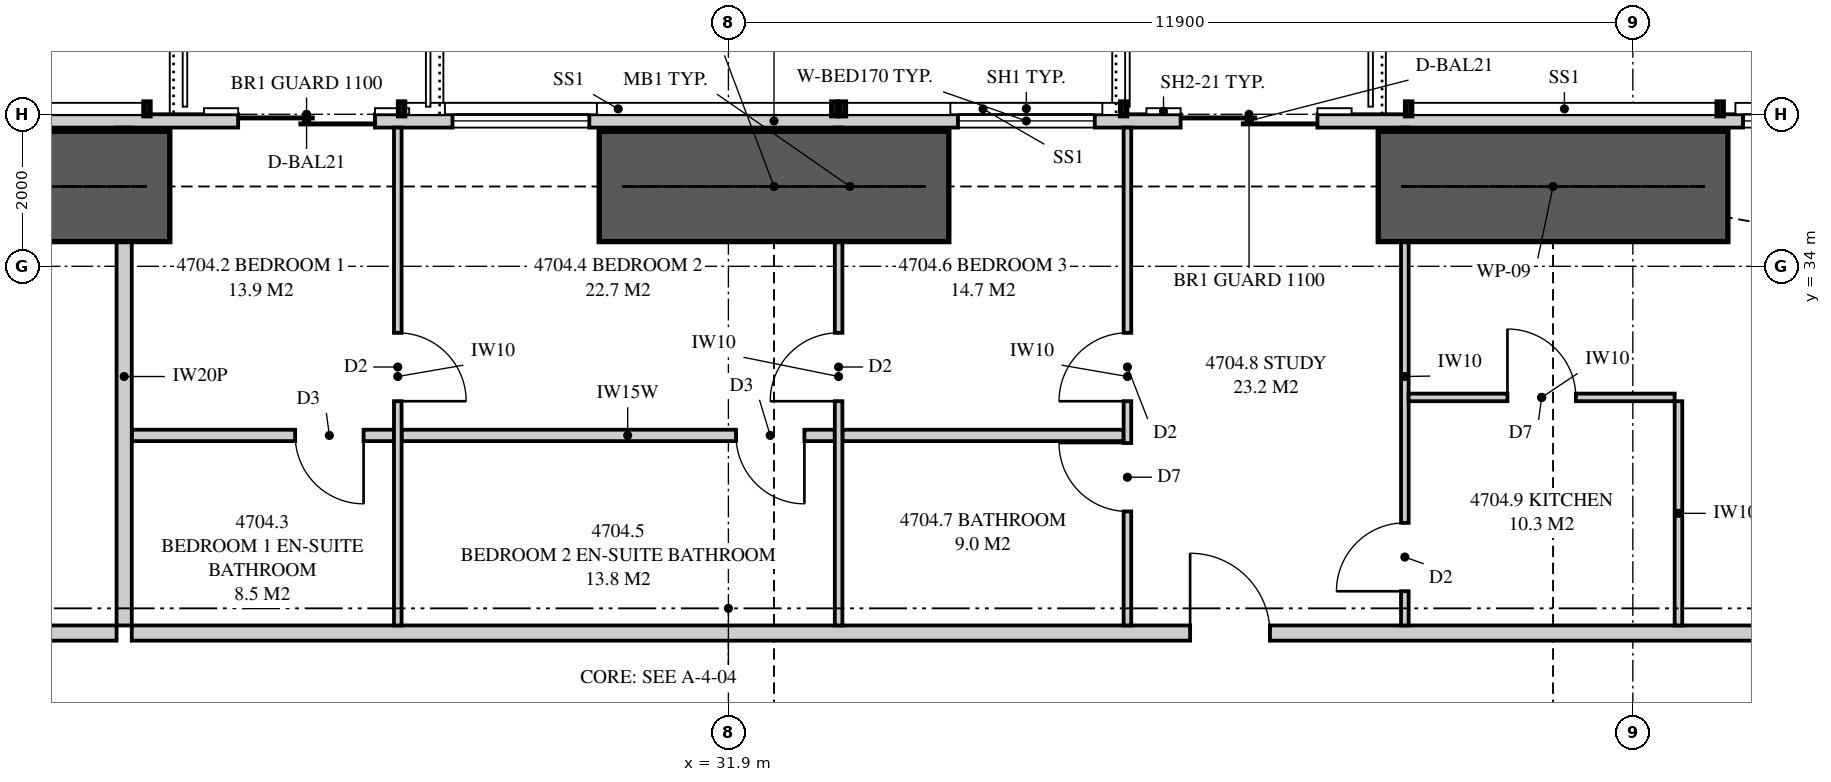
"""IFC4 building model, lengths in metres.
Left out: names, types, materials, properties, quantities, classifications, styles, units other than length and angle.
Written with IfcOpenShell. Run it as: python <this file> out.ifc"""

import sys

from ifc_helpers import new_model, si_unit, direction, frame, frame_2d, origin, place, context, subcontext, project, spatial, polyline, rectangle, outline, extrude, element, fill, save


model = new_model("IFC4")
c1 = context("Model", 3, precision=1e-05, world=origin(), true_north=direction((0.0, 1.0)))
c2 = subcontext(c1, "Body", "Model", "MODEL_VIEW")
j1 = project(units=[si_unit("LENGTHUNIT", "METRE"), si_unit("PLANEANGLEUNIT", "RADIAN")], contexts=[c1])
p1 = place(None, origin())
s1 = spatial("IfcSite", under=j1, at=p1, CompositionType="ELEMENT")
p2 = place(p1, origin())
s2 = spatial("IfcBuilding", under=s1, at=p2, CompositionType="ELEMENT")
p3 = place(p2, frame((0.0, 0.0, 174.45)))
s3 = spatial("IfcBuildingStorey", under=s2, at=p3, CompositionType="ELEMENT", Elevation=174.45)
p4 = place(p3, frame((49.949, 35.913, 0.0), z_axis=(0.0, 0.0, 1.0), x_axis=(-1.0, 0.0, 0.0)))
e1 = element("IfcWall", 1, at=p4, inside=s3, PredefinedType="SOLIDWALL", context=c2, shape_type="SweptSolid", body=[
    extrude(outline(polyline([(0.0, 0.0), (34.897, 0.0), (34.897, 3.11), (27.91, 3.11), (27.91, 2.15), (27.836, 2.15), (27.836, 3.11), (27.699, 3.11), (27.699, 2.15), (7.199, 2.15), (7.199, 3.11), (7.062, 3.11), (7.062, 2.15), (6.987, 2.15), (6.987, 3.11), (0.0, 3.11), (0.0, 0.0)])), frame((0.0, 0.087, 0.0), z_axis=(0.0, -1.0, 0.0), x_axis=(1.0, 0.0, 0.0)), (0.0, 0.0, 1.0), 0.175),
])
p5 = place(p4, frame((2.3, 0.0, 0.4)))
e2 = element("IfcOpeningElement", 2, at=p5, cuts=e1, PredefinedType="OPENING", context=c2, shape_type="SweptSolid", body=[
    extrude(rectangle(XDim=2.4, YDim=1.7, at=frame_2d((1.2, 0.85))), frame((0.0, 0.097, 0.0), z_axis=(0.0, -1.0, 0.0), x_axis=(1.0, 0.0, 0.0)), (0.0, 0.0, 1.0), 0.195),
])
p6 = place(p4, frame((10.299, 0.0, 0.0)))
e3 = element("IfcOpeningElement", 3, at=p6, cuts=e1, PredefinedType="OPENING", context=c2, shape_type="SweptSolid", body=[
    extrude(rectangle(XDim=1.8, YDim=2.1, at=frame_2d((0.9, 1.05))), frame((0.0, 0.097, 0.0), z_axis=(0.0, -1.0, 0.0), x_axis=(1.0, 0.0, 0.0)), (0.0, 0.0, 1.0), 0.195),
])
p7 = place(p4, frame((13.229, 0.0, 0.4)))
e4 = element("IfcOpeningElement", 4, at=p7, cuts=e1, PredefinedType="OPENING", context=c2, shape_type="SweptSolid", body=[
    extrude(rectangle(XDim=1.8, YDim=1.7, at=frame_2d((0.9, 0.85))), frame((0.0, 0.097, 0.0), z_axis=(0.0, -1.0, 0.0), x_axis=(1.0, 0.0, 0.0)), (0.0, 0.0, 1.0), 0.195),
])
p8 = place(p4, frame((19.879, 0.0, 0.4)))
e5 = element("IfcOpeningElement", 5, at=p8, cuts=e1, PredefinedType="OPENING", context=c2, shape_type="SweptSolid", body=[
    extrude(rectangle(XDim=1.8, YDim=1.7, at=frame_2d((0.9, 0.85))), frame((0.0, 0.097, 0.0), z_axis=(0.0, -1.0, 0.0), x_axis=(1.0, 0.0, 0.0)), (0.0, 0.0, 1.0), 0.195),
])
p9 = place(p4, frame((22.699, 0.0, 0.0)))
e6 = element("IfcOpeningElement", 6, at=p9, cuts=e1, PredefinedType="OPENING", context=c2, shape_type="SweptSolid", body=[
    extrude(rectangle(XDim=1.8, YDim=2.1, at=frame_2d((0.9, 1.05))), frame((0.0, 0.097, 0.0), z_axis=(0.0, -1.0, 0.0), x_axis=(1.0, 0.0, 0.0)), (0.0, 0.0, 1.0), 0.195),
])
p10 = place(p4, frame((30.243, 0.0, 0.4)))
e7 = element("IfcOpeningElement", 7, at=p10, cuts=e1, PredefinedType="OPENING", context=c2, shape_type="SweptSolid", body=[
    extrude(rectangle(XDim=1.2, YDim=1.7, at=frame_2d((0.6, 0.85))), frame((0.0, 0.097, 0.0), z_axis=(0.0, -1.0, 0.0), x_axis=(1.0, 0.0, 0.0)), (0.0, 0.0, 1.0), 0.195),
])
p11 = place(p3, frame((23.95, 35.825, 0.0), z_axis=(0.0, 0.0, 1.0), x_axis=(0.0, -1.0, 0.0)))
e8 = element("IfcWall", 8, at=p11, inside=s3, PredefinedType="PARTITIONING", context=c2, shape_type="SweptSolid", body=[
    extrude(outline(polyline([(0.529, 2.15), (0.0, 2.15), (0.0, 0.0), (0.529, 0.0), (0.529, 0.123), (1.021, 0.123), (1.021, 0.0), (6.55, 0.0), (6.55, 3.11), (1.685, 3.11), (1.685, 2.15), (1.021, 2.15), (1.021, 2.027), (0.529, 2.027), (0.529, 2.15)])), frame((0.0, 0.1, 0.0), z_axis=(0.0, -1.0, 0.0), x_axis=(1.0, 0.0, 0.0)), (0.0, 0.0, 1.0), 0.2),
])
p12 = place(p3, frame((17.85, 29.175, 0.0), z_axis=(0.0, 0.0, 1.0), x_axis=(1.0, 0.0, 0.0)))
e9 = element("IfcWall", 9, at=p12, inside=s3, PredefinedType="PARTITIONING", context=c2, shape_type="SweptSolid", body=[
    extrude(outline(polyline([(0.0, 0.0), (6.0, 0.0), (6.0, 3.11), (4.737, 3.11), (4.737, 2.541), (4.062, 2.541), (4.062, 3.11), (0.0, 3.11), (0.0, 0.0)])), frame((0.0, 0.1, 0.0), z_axis=(0.0, -1.0, 0.0), x_axis=(1.0, 0.0, 0.0)), (0.0, 0.0, 1.0), 0.2),
])
p13 = place(p12, frame((2.1, 0.0, 0.0)))
e10 = element("IfcOpeningElement", 10, at=p13, cuts=e9, PredefinedType="OPENING", context=c2, shape_type="SweptSolid", body=[
    extrude(rectangle(XDim=1.8, YDim=2.1, at=frame_2d((0.9, 1.05))), frame((0.0, 0.11, 0.0), z_axis=(0.0, -1.0, 0.0), x_axis=(1.0, 0.0, 0.0)), (0.0, 0.0, 1.0), 0.22),
])
p14 = place(p3, frame((24.05, 29.175, 0.0), z_axis=(0.0, 0.0, 1.0), x_axis=(1.0, 0.0, 0.0)))
e11 = element("IfcWall", 11, at=p14, inside=s3, PredefinedType="PARTITIONING", context=c2, shape_type="SweptSolid", body=[
    extrude(outline(polyline([(0.0, 0.0), (21.9, 0.0), (21.9, 3.11), (19.037, 3.11), (19.037, 2.541), (18.363, 2.541), (18.363, 3.11), (8.787, 3.11), (8.787, 2.541), (8.113, 2.541), (8.113, 3.11), (0.0, 3.11), (0.0, 0.0)])), frame((0.0, 0.1, 0.0), z_axis=(0.0, -1.0, 0.0), x_axis=(1.0, 0.0, 0.0)), (0.0, 0.0, 1.0), 0.2),
])
p15 = place(p14, frame((13.925, 0.0, 0.0)))
e12 = element("IfcOpeningElement", 12, at=p15, cuts=e11, PredefinedType="OPENING", context=c2, shape_type="SweptSolid", body=[
    extrude(rectangle(XDim=1.05, YDim=2.2, at=frame_2d((0.525, 1.1))), frame((0.0, 0.11, 0.0), z_axis=(0.0, -1.0, 0.0), x_axis=(1.0, 0.0, 0.0)), (0.0, 0.0, 1.0), 0.22),
])
p16 = place(p3, frame((27.55, 35.825, 0.0), z_axis=(0.0, 0.0, 1.0), x_axis=(0.0, -1.0, 0.0)))
e13 = element("IfcWall", 13, at=p16, inside=s3, PredefinedType="PARTITIONING", context=c2, shape_type="SweptSolid", body=[
    extrude(outline(polyline([(0.0, 0.0), (6.55, 0.0), (6.55, 3.11), (1.635, 3.11), (1.635, 2.15), (0.0, 2.15), (0.0, 3.11), (0.0, 0.0)])), frame((0.0, 0.05, 0.0), z_axis=(0.0, -1.0, 0.0), x_axis=(1.0, 0.0, 0.0)), (0.0, 0.0, 1.0), 0.1),
])
p17 = place(p16, frame((2.7, 0.0, 0.0)))
e14 = element("IfcOpeningElement", 14, at=p17, cuts=e13, PredefinedType="OPENING", context=c2, shape_type="SweptSolid", body=[
    extrude(rectangle(XDim=0.9, YDim=2.1, at=frame_2d((0.45, 1.05))), frame((0.0, 0.06, 0.0), z_axis=(0.0, -1.0, 0.0), x_axis=(1.0, 0.0, 0.0)), (0.0, 0.0, 1.0), 0.12),
])
p18 = place(p3, frame((33.35, 35.825, 0.0), z_axis=(0.0, 0.0, 1.0), x_axis=(0.0, -1.0, 0.0)))
e15 = element("IfcWall", 15, at=p18, inside=s3, PredefinedType="PARTITIONING", context=c2, shape_type="SweptSolid", body=[
    extrude(outline(polyline([(0.529, 2.15), (0.0, 2.15), (0.0, 0.0), (0.529, 0.0), (0.529, 0.793), (1.021, 0.793), (1.021, 0.0), (6.55, 0.0), (6.55, 3.11), (1.635, 3.11), (1.635, 2.15), (1.021, 2.15), (1.021, 1.357), (0.529, 1.357), (0.529, 2.15)])), frame((0.0, 0.05, 0.0), z_axis=(0.0, -1.0, 0.0), x_axis=(1.0, 0.0, 0.0)), (0.0, 0.0, 1.0), 0.1),
])
p19 = place(p18, frame((2.7, 0.0, 0.0)))
e16 = element("IfcOpeningElement", 16, at=p19, cuts=e15, PredefinedType="OPENING", context=c2, shape_type="SweptSolid", body=[
    extrude(rectangle(XDim=0.9, YDim=2.1, at=frame_2d((0.45, 1.05))), frame((0.0, 0.06, 0.0), z_axis=(0.0, -1.0, 0.0), x_axis=(1.0, 0.0, 0.0)), (0.0, 0.0, 1.0), 0.12),
])
p20 = place(p3, frame((37.15, 35.825, 0.0), z_axis=(0.0, 0.0, 1.0), x_axis=(0.0, -1.0, 0.0)))
e17 = element("IfcWall", 17, at=p20, inside=s3, PredefinedType="PARTITIONING", context=c2, shape_type="SweptSolid", body=[
    extrude(outline(polyline([(0.0, 0.0), (6.55, 0.0), (6.55, 3.11), (1.635, 3.11), (1.635, 2.15), (0.0, 2.15), (0.0, 3.11), (0.0, 0.0)])), frame((0.0, 0.05, 0.0), z_axis=(0.0, -1.0, 0.0), x_axis=(1.0, 0.0, 0.0)), (0.0, 0.0, 1.0), 0.1),
])
p21 = place(p20, frame((2.7, 0.0, 0.0)))
e18 = element("IfcOpeningElement", 18, at=p21, cuts=e17, PredefinedType="OPENING", context=c2, shape_type="SweptSolid", body=[
    extrude(rectangle(XDim=0.9, YDim=2.1, at=frame_2d((0.45, 1.05))), frame((0.0, 0.06, 0.0), z_axis=(0.0, -1.0, 0.0), x_axis=(1.0, 0.0, 0.0)), (0.0, 0.0, 1.0), 0.12),
])
p22 = place(p20, frame((4.15, 0.0, 0.0)))
e19 = element("IfcOpeningElement", 19, at=p22, cuts=e17, PredefinedType="OPENING", context=c2, shape_type="SweptSolid", body=[
    extrude(rectangle(XDim=0.9, YDim=2.1, at=frame_2d((0.45, 1.05))), frame((0.0, 0.06, 0.0), z_axis=(0.0, -1.0, 0.0), x_axis=(1.0, 0.0, 0.0)), (0.0, 0.0, 1.0), 0.12),
])
p23 = place(p3, frame((24.05, 31.775, 0.0), z_axis=(0.0, 0.0, 1.0), x_axis=(1.0, 0.0, 0.0)))
e20 = element("IfcWall", 20, at=p23, inside=s3, PredefinedType="PLUMBINGWALL", context=c2, shape_type="SweptSolid", body=[
    extrude(rectangle(XDim=3.45, YDim=0.15, at=frame_2d((1.725, 0.0))), origin(), (0.0, 0.0, 1.0), 3.11),
])
p24 = place(p23, frame((2.15, 0.0, 0.0)))
e21 = element("IfcOpeningElement", 21, at=p24, cuts=e20, PredefinedType="OPENING", context=c2, shape_type="SweptSolid", body=[
    extrude(rectangle(XDim=0.9, YDim=2.1, at=frame_2d((0.45, 1.05))), frame((0.0, 0.085, 0.0), z_axis=(0.0, -1.0, 0.0), x_axis=(1.0, 0.0, 0.0)), (0.0, 0.0, 1.0), 0.17),
])
p25 = place(p3, frame((27.6, 31.775, 0.0), z_axis=(0.0, 0.0, 1.0), x_axis=(1.0, 0.0, 0.0)))
e22 = element("IfcWall", 22, at=p25, inside=s3, PredefinedType="PLUMBINGWALL", context=c2, shape_type="SweptSolid", body=[
    extrude(outline(polyline([(0.0, 0.0), (5.7, 0.0), (5.7, 3.11), (5.212, 3.11), (5.212, 2.541), (4.588, 2.541), (4.588, 3.11), (0.0, 3.11), (0.0, 0.0)])), frame((0.0, 0.075, 0.0), z_axis=(0.0, -1.0, 0.0), x_axis=(1.0, 0.0, 0.0)), (0.0, 0.0, 1.0), 0.15),
])
p26 = place(p25, frame((4.4, 0.0, 0.0)))
e23 = element("IfcOpeningElement", 23, at=p26, cuts=e22, PredefinedType="OPENING", context=c2, shape_type="SweptSolid", body=[
    extrude(rectangle(XDim=0.9, YDim=2.1, at=frame_2d((0.45, 1.05))), frame((0.0, 0.085, 0.0), z_axis=(0.0, -1.0, 0.0), x_axis=(1.0, 0.0, 0.0)), (0.0, 0.0, 1.0), 0.17),
])
p27 = place(p3, frame((33.4, 31.775, 0.0), z_axis=(0.0, 0.0, 1.0), x_axis=(1.0, 0.0, 0.0)))
e24 = element("IfcWall", 24, at=p27, inside=s3, PredefinedType="PLUMBINGWALL", context=c2, shape_type="SweptSolid", body=[
    extrude(rectangle(XDim=3.7, YDim=0.15, at=frame_2d((1.85, 0.0))), origin(), (0.0, 0.0, 1.0), 3.11),
])
p28 = place(p3, frame((40.8, 35.825, 0.0), z_axis=(0.0, 0.0, 1.0), x_axis=(0.0, -1.0, 0.0)))
e25 = element("IfcWall", 25, at=p28, inside=s3, PredefinedType="PARTITIONING", context=c2, shape_type="SweptSolid", body=[
    extrude(outline(polyline([(0.0, 0.0), (6.55, 0.0), (6.55, 3.11), (1.635, 3.11), (1.635, 2.15), (0.0, 2.15), (0.0, 3.11), (0.0, 0.0)])), frame((0.0, 0.05, 0.0), z_axis=(0.0, -1.0, 0.0), x_axis=(1.0, 0.0, 0.0)), (0.0, 0.0, 1.0), 0.1),
])
p29 = place(p28, frame((5.2, 0.0, 0.0)))
e26 = element("IfcOpeningElement", 26, at=p29, cuts=e25, PredefinedType="OPENING", context=c2, shape_type="SweptSolid", body=[
    extrude(rectangle(XDim=0.9, YDim=2.1, at=frame_2d((0.45, 1.05))), frame((0.0, 0.06, 0.0), z_axis=(0.0, -1.0, 0.0), x_axis=(1.0, 0.0, 0.0)), (0.0, 0.0, 1.0), 0.12),
])
p30 = place(p3, frame((40.85, 32.275, 0.0), z_axis=(0.0, 0.0, 1.0), x_axis=(1.0, 0.0, 0.0)))
e27 = element("IfcWall", 27, at=p30, inside=s3, PredefinedType="PARTITIONING", context=c2, shape_type="SweptSolid", body=[
    extrude(outline(polyline([(0.0, 0.0), (3.5, 0.0), (3.5, 3.11), (2.188, 3.11), (2.188, 2.541), (1.613, 2.541), (1.613, 3.11), (0.0, 3.11), (0.0, 0.0)])), frame((0.0, 0.05, 0.0), z_axis=(0.0, -1.0, 0.0), x_axis=(1.0, 0.0, 0.0)), (0.0, 0.0, 1.0), 0.1),
])
p31 = place(p30, frame((1.3, 0.0, 0.0)))
e28 = element("IfcOpeningElement", 28, at=p31, cuts=e27, PredefinedType="OPENING", context=c2, shape_type="SweptSolid", body=[
    extrude(rectangle(XDim=0.9, YDim=2.1, at=frame_2d((0.45, 1.05))), frame((0.0, 0.06, 0.0), z_axis=(0.0, -1.0, 0.0), x_axis=(1.0, 0.0, 0.0)), (0.0, 0.0, 1.0), 0.12),
])
p32 = place(p3, frame((44.4, 32.225, 0.0), z_axis=(0.0, 0.0, 1.0), x_axis=(0.0, -1.0, 0.0)))
e29 = element("IfcWall", 29, at=p32, inside=s3, PredefinedType="PARTITIONING", context=c2, shape_type="SweptSolid", body=[
    extrude(rectangle(XDim=2.95, YDim=0.1, at=frame_2d((1.475, 0.0))), origin(), (0.0, 0.0, 1.0), 3.11),
])
for number, where, z_axis, x_axis in (
    (30, (40.45, 35.05, 0.0), (0.0, 0.0, 1.0), (1.0, 0.0, 0.0)),
    (31, (30.2, 35.05, 0.0), (0.0, 0.0, 1.0), (1.0, 0.0, 0.0)),
    (32, (19.95, 35.05, 0.0), (0.0, 0.0, 1.0), (1.0, 0.0, 0.0)),
):
    element("IfcWall", number, at=place(p3, frame(where, z_axis=z_axis, x_axis=x_axis)), inside=s3, PredefinedType="SHEAR", context=c2, shape_type="SweptSolid", body=[
        extrude(rectangle(XDim=4.6, YDim=1.45, at=frame_2d((2.3, 0.0))), origin(), (0.0, 0.0, 1.0), 3.35),
    ])
p33 = place(p5, origin())
e33 = element("IfcWindow", 33, at=p33, inside=s3, PartitioningType="SINGLE_PANEL", PredefinedType="WINDOW", context=c2, shape_type="SweptSolid", body=[
    extrude(rectangle(XDim=2.4, YDim=1.7, at=frame_2d((1.2, 0.85))), frame((0.0, 0.03, 0.0), z_axis=(0.0, -1.0, 0.0), x_axis=(1.0, 0.0, 0.0)), (0.0, 0.0, 1.0), 0.06),
])
fill(e2, e33)
p34 = place(p6, origin())
e34 = element("IfcDoor", 34, at=p34, inside=s3, OperationType="SLIDING_TO_LEFT", PredefinedType="DOOR", context=c2, shape_type="SweptSolid", body=[
    extrude(rectangle(XDim=1.8, YDim=2.1, at=frame_2d((0.9, 1.05))), frame((0.0, 0.025, 0.0), z_axis=(0.0, -1.0, 0.0), x_axis=(1.0, 0.0, 0.0)), (0.0, 0.0, 1.0), 0.05),
])
fill(e3, e34)
p35 = place(p7, origin())
e35 = element("IfcWindow", 35, at=p35, inside=s3, PartitioningType="SINGLE_PANEL", PredefinedType="WINDOW", context=c2, shape_type="SweptSolid", body=[
    extrude(rectangle(XDim=1.8, YDim=1.7, at=frame_2d((0.9, 0.85))), frame((0.0, 0.03, 0.0), z_axis=(0.0, -1.0, 0.0), x_axis=(1.0, 0.0, 0.0)), (0.0, 0.0, 1.0), 0.06),
])
fill(e4, e35)
p36 = place(p8, origin())
e36 = element("IfcWindow", 36, at=p36, inside=s3, PartitioningType="SINGLE_PANEL", PredefinedType="WINDOW", context=c2, shape_type="SweptSolid", body=[
    extrude(rectangle(XDim=1.8, YDim=1.7, at=frame_2d((0.9, 0.85))), frame((0.0, 0.03, 0.0), z_axis=(0.0, -1.0, 0.0), x_axis=(1.0, 0.0, 0.0)), (0.0, 0.0, 1.0), 0.06),
])
fill(e5, e36)
p37 = place(p9, origin())
e37 = element("IfcDoor", 37, at=p37, inside=s3, OperationType="SLIDING_TO_LEFT", PredefinedType="DOOR", context=c2, shape_type="SweptSolid", body=[
    extrude(rectangle(XDim=1.8, YDim=2.1, at=frame_2d((0.9, 1.05))), frame((0.0, 0.025, 0.0), z_axis=(0.0, -1.0, 0.0), x_axis=(1.0, 0.0, 0.0)), (0.0, 0.0, 1.0), 0.05),
])
fill(e6, e37)
p38 = place(p15, origin())
e38 = element("IfcDoor", 38, at=p38, inside=s3, OperationType="SINGLE_SWING_LEFT", PredefinedType="DOOR", context=c2, shape_type="SweptSolid", body=[
    extrude(rectangle(XDim=1.05, YDim=2.2, at=frame_2d((0.525, 1.1))), frame((0.0, 0.025, 0.0), z_axis=(0.0, -1.0, 0.0), x_axis=(1.0, 0.0, 0.0)), (0.0, 0.0, 1.0), 0.05),
])
fill(e12, e38)
p39 = place(p17, origin())
e39 = element("IfcDoor", 39, at=p39, inside=s3, OperationType="SINGLE_SWING_RIGHT", PredefinedType="DOOR", context=c2, shape_type="SweptSolid", body=[
    extrude(rectangle(XDim=0.9, YDim=2.1, at=frame_2d((0.45, 1.05))), frame((0.0, 0.025, 0.0), z_axis=(0.0, -1.0, 0.0), x_axis=(1.0, 0.0, 0.0)), (0.0, 0.0, 1.0), 0.05),
])
fill(e14, e39)
p40 = place(p24, frame((0.9, 0.0, 0.0), z_axis=(0.0, 0.0, 1.0), x_axis=(-1.0, 0.0, 0.0)))
e40 = element("IfcDoor", 40, at=p40, inside=s3, OperationType="SINGLE_SWING_LEFT", PredefinedType="DOOR", context=c2, shape_type="SweptSolid", body=[
    extrude(rectangle(XDim=0.9, YDim=2.1, at=frame_2d((0.45, 1.05))), frame((0.0, 0.025, 0.0), z_axis=(0.0, -1.0, 0.0), x_axis=(1.0, 0.0, 0.0)), (0.0, 0.0, 1.0), 0.05),
])
fill(e21, e40)
p41 = place(p19, frame((0.9, 0.0, 0.0), z_axis=(0.0, 0.0, 1.0), x_axis=(-1.0, 0.0, 0.0)))
e41 = element("IfcDoor", 41, at=p41, inside=s3, OperationType="SINGLE_SWING_LEFT", PredefinedType="DOOR", context=c2, shape_type="SweptSolid", body=[
    extrude(rectangle(XDim=0.9, YDim=2.1, at=frame_2d((0.45, 1.05))), frame((0.0, 0.025, 0.0), z_axis=(0.0, -1.0, 0.0), x_axis=(1.0, 0.0, 0.0)), (0.0, 0.0, 1.0), 0.05),
])
fill(e16, e41)
p42 = place(p26, frame((0.9, 0.0, 0.0), z_axis=(0.0, 0.0, 1.0), x_axis=(-1.0, 0.0, 0.0)))
e42 = element("IfcDoor", 42, at=p42, inside=s3, OperationType="SINGLE_SWING_LEFT", PredefinedType="DOOR", context=c2, shape_type="SweptSolid", body=[
    extrude(rectangle(XDim=0.9, YDim=2.1, at=frame_2d((0.45, 1.05))), frame((0.0, 0.025, 0.0), z_axis=(0.0, -1.0, 0.0), x_axis=(1.0, 0.0, 0.0)), (0.0, 0.0, 1.0), 0.05),
])
fill(e23, e42)
p43 = place(p21, frame((0.9, 0.0, 0.0), z_axis=(0.0, 0.0, 1.0), x_axis=(-1.0, 0.0, 0.0)))
e43 = element("IfcDoor", 43, at=p43, inside=s3, OperationType="SINGLE_SWING_LEFT", PredefinedType="DOOR", context=c2, shape_type="SweptSolid", body=[
    extrude(rectangle(XDim=0.9, YDim=2.1, at=frame_2d((0.45, 1.05))), frame((0.0, 0.025, 0.0), z_axis=(0.0, -1.0, 0.0), x_axis=(1.0, 0.0, 0.0)), (0.0, 0.0, 1.0), 0.05),
])
fill(e18, e43)
p44 = place(p22, frame((0.9, 0.0, 0.0), z_axis=(0.0, 0.0, 1.0), x_axis=(-1.0, 0.0, 0.0)))
e44 = element("IfcDoor", 44, at=p44, inside=s3, OperationType="SINGLE_SWING_RIGHT", PredefinedType="DOOR", context=c2, shape_type="SweptSolid", body=[
    extrude(rectangle(XDim=0.9, YDim=2.1, at=frame_2d((0.45, 1.05))), frame((0.0, 0.025, 0.0), z_axis=(0.0, -1.0, 0.0), x_axis=(1.0, 0.0, 0.0)), (0.0, 0.0, 1.0), 0.05),
])
fill(e19, e44)
p45 = place(p29, frame((0.9, 0.0, 0.0), z_axis=(0.0, 0.0, 1.0), x_axis=(-1.0, 0.0, 0.0)))
e45 = element("IfcDoor", 45, at=p45, inside=s3, OperationType="SINGLE_SWING_LEFT", PredefinedType="DOOR", context=c2, shape_type="SweptSolid", body=[
    extrude(rectangle(XDim=0.9, YDim=2.1, at=frame_2d((0.45, 1.05))), frame((0.0, 0.025, 0.0), z_axis=(0.0, -1.0, 0.0), x_axis=(1.0, 0.0, 0.0)), (0.0, 0.0, 1.0), 0.05),
])
fill(e26, e45)
p46 = place(p31, origin())
e46 = element("IfcDoor", 46, at=p46, inside=s3, OperationType="SINGLE_SWING_LEFT", PredefinedType="DOOR", context=c2, shape_type="SweptSolid", body=[
    extrude(rectangle(XDim=0.9, YDim=2.1, at=frame_2d((0.45, 1.05))), frame((0.0, 0.025, 0.0), z_axis=(0.0, -1.0, 0.0), x_axis=(1.0, 0.0, 0.0)), (0.0, 0.0, 1.0), 0.05),
])
fill(e28, e46)
save(model, sys.argv[1])
